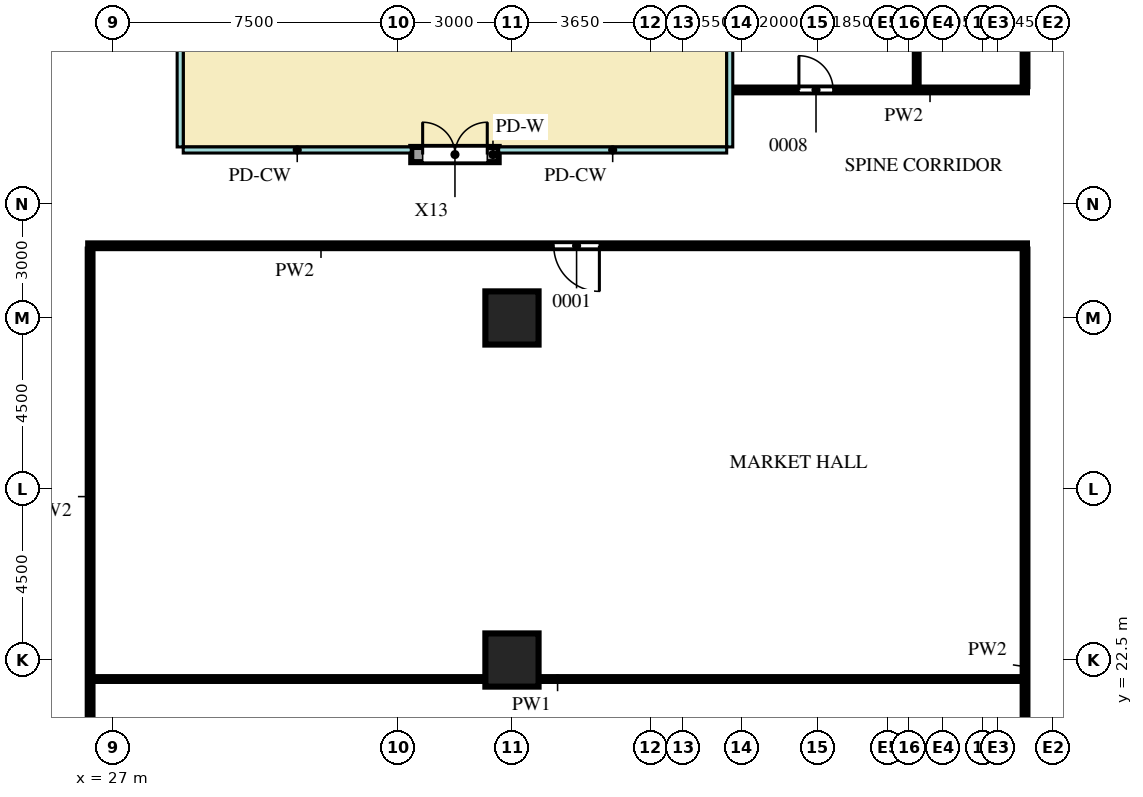
"""IFC4 building model, lengths in metres.
Left out: names, types, materials, properties, quantities, classifications, styles, units other than length and angle.
Written with IfcOpenShell. Run it as: python <this file> out.ifc"""

import sys

from ifc_helpers import new_model, si_unit, direction, frame, frame_2d, origin, origin_2d, place, context, subcontext, project, spatial, rectangle, extrude, source, transform, mapped, element, fill, save


model = new_model("IFC4")
c1 = context("Model", 3, precision=1e-05, world=origin(), true_north=direction((0.0, 1.0)))
c2 = subcontext(c1, "Body", "Model", "MODEL_VIEW")
j1 = project(units=[si_unit("LENGTHUNIT", "METRE"), si_unit("PLANEANGLEUNIT", "RADIAN")], contexts=[c1])
p1 = place(None, origin())
s1 = spatial("IfcSite", under=j1, at=p1, CompositionType="ELEMENT")
p2 = place(p1, origin())
s2 = spatial("IfcBuilding", under=s1, at=p2, CompositionType="ELEMENT")
p3 = place(p2, origin())
s3 = spatial("IfcBuildingStorey", under=s2, at=p3, CompositionType="ELEMENT", Elevation=0.0)
m1 = source(origin(), c2, "Body", "SweptSolid", [
    extrude(rectangle(XDim=1.4, YDim=1.4, at=origin_2d()), origin(), (0.0, 0.0, 1.0), 7.2),
])
for number, where, z_axis, x_axis in (
    (1, (37.5, 22.5, 0.0), (0.0, 0.0, 1.0), (1.0, 0.0, 0.0)),
    (2, (37.5, 31.5, 0.0), (0.0, 0.0, 1.0), (1.0, 0.0, 0.0)),
):
    element("IfcColumn", number, at=place(p3, frame(where, z_axis=z_axis, x_axis=x_axis)), inside=s3, PredefinedType="COLUMN", context=c2, shape_type="MappedRepresentation", body=[
        mapped(m1, transform((0.0, 0.0, 0.0))),
    ])
m2 = source(origin(), c2, "Body", "SweptSolid", [
    extrude(rectangle(XDim=2.3, YDim=0.4, at=frame_2d((1.15, 0.0))), origin(), (0.0, 0.0, 1.0), 7.15),
])
p4 = place(p3, frame((37.15, 35.8, 0.0), z_axis=(0.0, 0.0, 1.0), x_axis=(-1.0, 0.0, 0.0)))
e3 = element("IfcWall", 3, at=p4, inside=s3, PredefinedType="SOLIDWALL", context=c2, shape_type="MappedRepresentation", body=[
    mapped(m2, transform((0.0, 0.0, 0.0))),
])
m3 = source(origin(), c2, "Body", "SweptSolid", [
    extrude(rectangle(XDim=1.7, YDim=2.4, at=frame_2d((0.85, 1.2))), frame((0.0, 0.21, 0.0), z_axis=(0.0, -1.0, 0.0), x_axis=(1.0, 0.0, 0.0)), (0.0, 0.0, 1.0), 0.42),
])
p5 = place(p4, frame((2.0, 0.0, 0.0), z_axis=(0.0, 0.0, 1.0), x_axis=(-1.0, 0.0, 0.0)))
e4 = element("IfcOpeningElement", 4, at=p5, cuts=e3, PredefinedType="OPENING", context=c2, shape_type="MappedRepresentation", body=[
    mapped(m3, transform((0.0, 0.0, 0.0))),
])
m4 = source(origin(), c2, "Body", "SweptSolid", [
    extrude(rectangle(XDim=29.7, YDim=0.125, at=frame_2d((14.85, 0.0))), origin(), (0.0, 0.0, 1.0), 7.2),
])
p6 = place(p3, frame((51.0, 3.6, 0.0), z_axis=(0.0, 0.0, 1.0), x_axis=(0.0, 1.0, 0.0)))
e5 = element("IfcWall", 5, at=p6, inside=s3, PredefinedType="PARTITIONING", context=c2, shape_type="MappedRepresentation", body=[
    mapped(m4, transform((0.0, 0.0, 0.0))),
])
m5 = source(origin(), c2, "Body", "SweptSolid", [
    extrude(rectangle(XDim=1.2, YDim=2.1, at=frame_2d((0.6, 1.05))), frame((0.0, 0.073, 0.0), z_axis=(0.0, -1.0, 0.0), x_axis=(1.0, 0.0, 0.0)), (0.0, 0.0, 1.0), 0.145),
])
p7 = place(p6, frame((6.55, 0.0, 0.0)))
e6 = element("IfcOpeningElement", 6, at=p7, cuts=e5, PredefinedType="OPENING", context=c2, shape_type="MappedRepresentation", body=[
    mapped(m5, transform((0.0, 0.0, 0.0))),
])
m6 = source(origin(), c2, "Body", "SweptSolid", [
    extrude(rectangle(XDim=27.15, YDim=0.125, at=frame_2d((13.575, 0.0))), origin(), (0.0, 0.0, 1.0), 7.2),
])
p8 = place(p3, frame((26.4, 6.15, 0.0), z_axis=(0.0, 0.0, 1.0), x_axis=(0.0, 1.0, 0.0)))
e7 = element("IfcWall", 7, at=p8, inside=s3, PredefinedType="PARTITIONING", context=c2, shape_type="MappedRepresentation", body=[
    mapped(m6, transform((0.0, 0.0, 0.0))),
])
p9 = place(p8, frame((5.4, 0.0, 0.0)))
e8 = element("IfcOpeningElement", 8, at=p9, cuts=e7, PredefinedType="OPENING", context=c2, shape_type="MappedRepresentation", body=[
    mapped(m5, transform((0.0, 0.0, 0.0))),
])
m7 = source(origin(), c2, "Body", "SweptSolid", [
    extrude(rectangle(XDim=0.9, YDim=2.1, at=frame_2d((0.45, 1.05))), frame((0.0, 0.073, 0.0), z_axis=(0.0, -1.0, 0.0), x_axis=(1.0, 0.0, 0.0)), (0.0, 0.0, 1.0), 0.145),
])
p10 = place(p8, frame((13.25, 0.0, 0.0)))
e9 = element("IfcOpeningElement", 9, at=p10, cuts=e7, PredefinedType="OPENING", context=c2, shape_type="MappedRepresentation", body=[
    mapped(m7, transform((0.0, 0.0, 0.0))),
])
m8 = source(origin(), c2, "Body", "SweptSolid", [
    extrude(rectangle(XDim=24.4, YDim=0.1, at=frame_2d((12.2, 0.0))), origin(), (0.0, 0.0, 1.0), 7.2),
])
p11 = place(p3, frame((26.5, 22.0, 0.0), z_axis=(0.0, 0.0, 1.0), x_axis=(1.0, 0.0, 0.0)))
e10 = element("IfcWall", 10, at=p11, inside=s3, PredefinedType="PARTITIONING", context=c2, shape_type="MappedRepresentation", body=[
    mapped(m8, transform((0.0, 0.0, 0.0))),
])
m9 = source(origin(), c2, "Body", "SweptSolid", [
    extrude(rectangle(XDim=24.7, YDim=0.125, at=frame_2d((12.35, 0.0))), origin(), (0.0, 0.0, 1.0), 7.2),
])
p12 = place(p3, frame((26.35, 33.4, 0.0), z_axis=(0.0, 0.0, 1.0), x_axis=(1.0, 0.0, 0.0)))
e11 = element("IfcWall", 11, at=p12, inside=s3, PredefinedType="PARTITIONING", context=c2, shape_type="MappedRepresentation", body=[
    mapped(m9, transform((0.0, 0.0, 0.0))),
])
p13 = place(p12, frame((12.25, 0.0, 0.0)))
e12 = element("IfcOpeningElement", 12, at=p13, cuts=e11, PredefinedType="OPENING", context=c2, shape_type="MappedRepresentation", body=[
    mapped(m5, transform((0.0, 0.0, 0.0))),
])
m10 = source(origin(), c2, "Body", "SweptSolid", [
    extrude(rectangle(XDim=7.8, YDim=0.125, at=frame_2d((3.9, 0.0))), origin(), (0.0, 0.0, 1.0), 7.2),
])
p14 = place(p3, frame((43.25, 37.5, 0.0), z_axis=(0.0, 0.0, 1.0), x_axis=(1.0, 0.0, 0.0)))
e13 = element("IfcWall", 13, at=p14, inside=s3, PredefinedType="PARTITIONING", context=c2, shape_type="MappedRepresentation", body=[
    mapped(m10, transform((0.0, 0.0, 0.0))),
])
p15 = place(p14, frame((1.8, 0.0, 0.0)))
e14 = element("IfcOpeningElement", 14, at=p15, cuts=e13, PredefinedType="OPENING", context=c2, shape_type="MappedRepresentation", body=[
    mapped(m7, transform((0.0, 0.0, 0.0))),
])
m11 = source(origin(), c2, "Body", "SweptSolid", [
    extrude(rectangle(XDim=16.3, YDim=0.1, at=frame_2d((8.15, 0.0))), origin(), (0.0, 0.0, 1.0), 7.2),
])
p16 = place(p3, frame((48.15, 37.6, 0.0), z_axis=(0.0, 0.0, 1.0), x_axis=(0.0, 1.0, 0.0)))
e15 = element("IfcWall", 15, at=p16, inside=s3, PredefinedType="PARTITIONING", context=c2, shape_type="MappedRepresentation", body=[
    mapped(m11, transform((0.0, 0.0, 0.0))),
])
m12 = source(origin(), c2, "Body", "SweptSolid", [
    extrude(rectangle(XDim=12.9, YDim=0.125, at=frame_2d((6.45, 0.0))), origin(), (0.0, 0.0, 1.0), 7.2),
])
p17 = place(p3, frame((51.0, 37.6, 0.0), z_axis=(0.0, 0.0, 1.0), x_axis=(0.0, 1.0, 0.0)))
e16 = element("IfcWall", 16, at=p17, inside=s3, PredefinedType="PARTITIONING", context=c2, shape_type="MappedRepresentation", body=[
    mapped(m12, transform((0.0, 0.0, 0.0))),
])
p18 = place(p17, frame((5.85, 0.0, 0.0)))
e17 = element("IfcOpeningElement", 17, at=p18, cuts=e16, PredefinedType="OPENING", context=c2, shape_type="MappedRepresentation", body=[
    mapped(m5, transform((0.0, 0.0, 0.0))),
])
m13 = source(origin(), c2, "Body", "SweptSolid", [
    extrude(rectangle(XDim=1.7, YDim=2.4, at=frame_2d((0.85, 1.2))), frame((0.0, 0.025, 0.0), z_axis=(0.0, -1.0, 0.0), x_axis=(1.0, 0.0, 0.0)), (0.0, 0.0, 1.0), 0.05),
])
p19 = place(p5, origin())
e18 = element("IfcDoor", 18, at=p19, inside=s3, OperationType="DOUBLE_DOOR_SINGLE_SWING", PredefinedType="DOOR", context=c2, shape_type="MappedRepresentation", body=[
    mapped(m13, transform((0.0, 0.0, 0.0))),
])
fill(e4, e18)
m14 = source(origin(), c2, "Body", "SweptSolid", [
    extrude(rectangle(XDim=1.2, YDim=2.1, at=frame_2d((0.6, 1.05))), frame((0.0, 0.025, 0.0), z_axis=(0.0, -1.0, 0.0), x_axis=(1.0, 0.0, 0.0)), (0.0, 0.0, 1.0), 0.05),
])
p20 = place(p13, origin())
e19 = element("IfcDoor", 19, at=p20, inside=s3, OperationType="SINGLE_SWING_RIGHT", PredefinedType="DOOR", context=c2, shape_type="MappedRepresentation", body=[
    mapped(m14, transform((0.0, 0.0, 0.0))),
])
fill(e12, e19)
m15 = source(origin(), c2, "Body", "SweptSolid", [
    extrude(rectangle(XDim=0.9, YDim=2.1, at=frame_2d((0.45, 1.05))), frame((0.0, 0.025, 0.0), z_axis=(0.0, -1.0, 0.0), x_axis=(1.0, 0.0, 0.0)), (0.0, 0.0, 1.0), 0.05),
])
p21 = place(p15, origin())
e20 = element("IfcDoor", 20, at=p21, inside=s3, OperationType="SINGLE_SWING_RIGHT", PredefinedType="DOOR", context=c2, shape_type="MappedRepresentation", body=[
    mapped(m15, transform((0.0, 0.0, 0.0))),
])
fill(e14, e20)
save(model, sys.argv[1])
